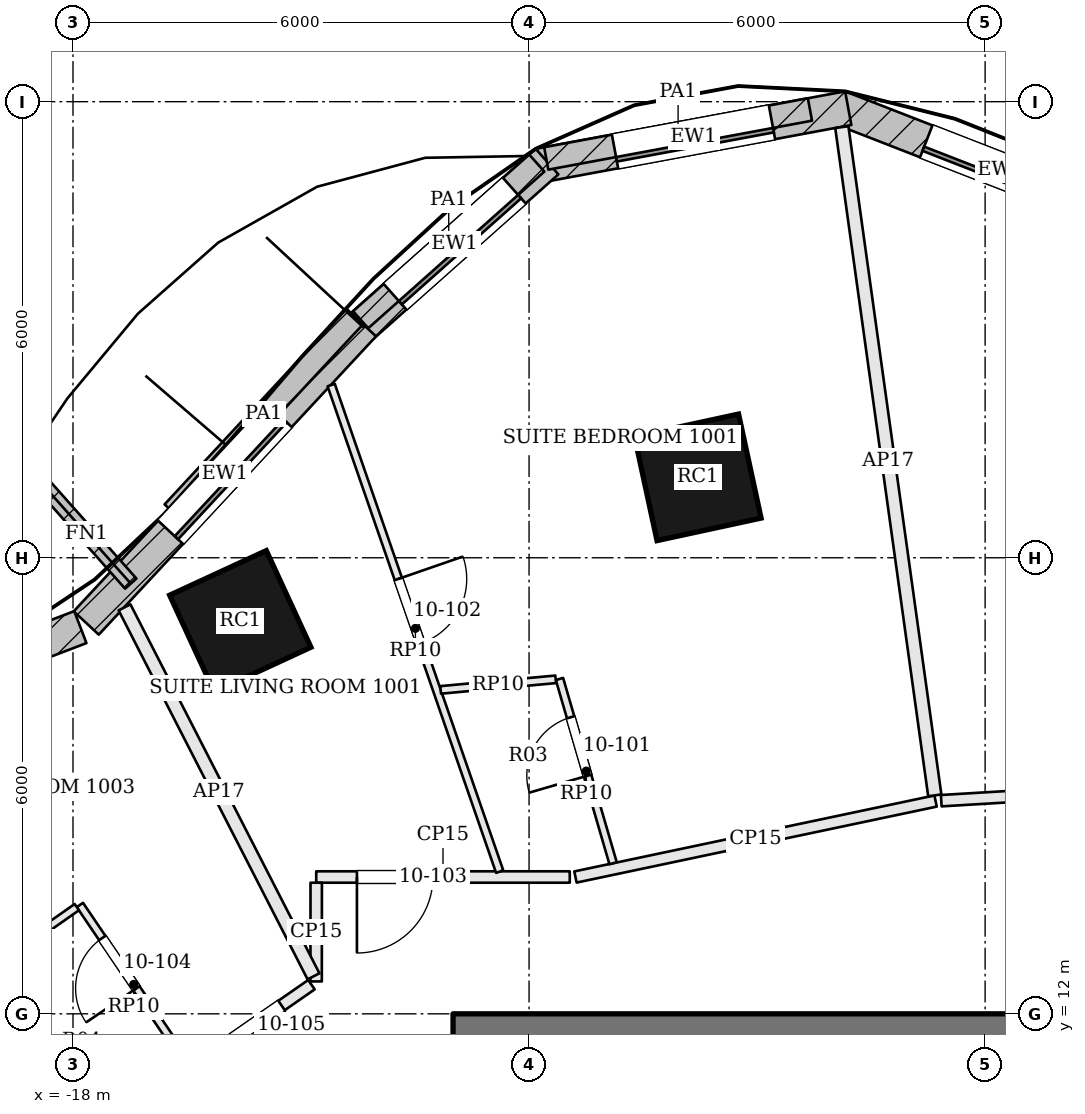
"""IFC4 building model, lengths in metres.
Left out: names, types, materials, properties, quantities, classifications, styles, units other than length and angle.
Written with IfcOpenShell. Run it as: python <this file> out.ifc"""

import sys

from ifc_helpers import new_model, si_unit, direction, frame, frame_2d, origin, origin_2d, place, context, subcontext, project, spatial, rectangle, extrude, element, fill, save


model = new_model("IFC4")
c1 = context("Model", 3, precision=1e-05, world=origin(), true_north=direction((0.0, 1.0)))
c2 = subcontext(c1, "Body", "Model", "MODEL_VIEW")
j1 = project(units=[si_unit("LENGTHUNIT", "METRE"), si_unit("PLANEANGLEUNIT", "RADIAN")], contexts=[c1])
p1 = place(None, origin())
s1 = spatial("IfcSite", under=j1, at=p1, CompositionType="ELEMENT")
p2 = place(p1, origin())
s2 = spatial("IfcBuilding", under=s1, at=p2, CompositionType="ELEMENT")
p3 = place(p2, frame((0.0, 0.0, 51.9)))
s3 = spatial("IfcBuildingStorey", under=s2, at=p3, CompositionType="ELEMENT", Elevation=51.9)
p4 = place(p3, frame((-13.0, 11.3, 0.0), z_axis=(0.0, 0.0, 1.0), x_axis=(1.0, 0.0, 0.0)))
e1 = element("IfcWall", 1, at=p4, inside=s3, PredefinedType="SHEAR", context=c2, shape_type="SweptSolid", body=[
    extrude(rectangle(XDim=26.0, YDim=1.4, at=frame_2d((13.0, 0.0))), origin(), (0.0, 0.0, 1.0), 3.6),
])
p5 = place(p4, frame((8.575, 0.0, 0.0)))
e2 = element("IfcOpeningElement", 2, at=p5, cuts=e1, PredefinedType="OPENING", context=c2, shape_type="SweptSolid", body=[
    extrude(rectangle(XDim=0.7, YDim=2.1, at=frame_2d((0.35, 1.05))), frame((0.0, 0.71, 0.0), z_axis=(0.0, -1.0, 0.0), x_axis=(1.0, 0.0, 0.0)), (0.0, 0.0, 1.0), 1.42),
])
p6 = place(p4, frame((10.875, 0.0, 0.0)))
e3 = element("IfcOpeningElement", 3, at=p6, cuts=e1, PredefinedType="OPENING", context=c2, shape_type="SweptSolid", body=[
    extrude(rectangle(XDim=1.0, YDim=2.1, at=frame_2d((0.5, 1.05))), frame((0.0, 0.71, 0.0), z_axis=(0.0, -1.0, 0.0), x_axis=(1.0, 0.0, 0.0)), (0.0, 0.0, 1.0), 1.42),
])
p7 = place(p4, frame((13.725, 0.0, 0.0)))
e4 = element("IfcOpeningElement", 4, at=p7, cuts=e1, PredefinedType="OPENING", context=c2, shape_type="SweptSolid", body=[
    extrude(rectangle(XDim=1.0, YDim=2.1, at=frame_2d((0.5, 1.05))), frame((0.0, 0.71, 0.0), z_axis=(0.0, -1.0, 0.0), x_axis=(1.0, 0.0, 0.0)), (0.0, 0.0, 1.0), 1.42),
])
p8 = place(p4, frame((16.175, 0.0, 0.0)))
e5 = element("IfcOpeningElement", 5, at=p8, cuts=e1, PredefinedType="OPENING", context=c2, shape_type="SweptSolid", body=[
    extrude(rectangle(XDim=1.0, YDim=2.1, at=frame_2d((0.5, 1.05))), frame((0.0, 0.71, 0.0), z_axis=(0.0, -1.0, 0.0), x_axis=(1.0, 0.0, 0.0)), (0.0, 0.0, 1.0), 1.42),
])
for number, where, z_axis, x_axis in (
    (6, (-9.78, 19.058, 0.0), (0.0, 0.0, 1.0), (-0.977, -0.211, 0.0)),
    (7, (-15.799, 17.165, 0.0), (0.0, 0.0, 1.0), (-0.908, -0.419, 0.0)),
):
    element("IfcColumn", number, at=place(p3, frame(where, z_axis=z_axis, x_axis=x_axis)), inside=s3, PredefinedType="COLUMN", context=c2, shape_type="SweptSolid", body=[
        extrude(rectangle(XDim=1.4, YDim=1.4, at=origin_2d()), origin(), (0.0, 0.0, 1.0), 3.6),
    ])
p9 = place(p3, frame((-3.672, 22.27, 0.0), z_axis=(0.0, 0.0, 1.0), x_axis=(-0.931791503167, 0.36299393194, 0.0)))
e8 = element("IfcWall", 8, at=p9, inside=s3, PredefinedType="SOLIDWALL", context=c2, shape_type="SweptSolid", body=[
    extrude(rectangle(XDim=4.56, YDim=0.45, at=frame_2d((2.28, 0.0))), origin(), (0.0, 0.0, 1.0), 3.4),
])
p10 = place(p9, frame((1.23, 0.0, 0.9)))
e9 = element("IfcOpeningElement", 9, at=p10, cuts=e8, PredefinedType="OPENING", context=c2, shape_type="SweptSolid", body=[
    extrude(rectangle(XDim=2.1, YDim=2.0, at=frame_2d((1.05, 1.0))), frame((0.0, 0.235, 0.0), z_axis=(0.0, -1.0, 0.0), x_axis=(1.0, 0.0, 0.0)), (0.0, 0.0, 1.0), 0.47),
])
p11 = place(p3, frame((-7.801, 23.915, 0.0), z_axis=(0.0, 0.0, 1.0), x_axis=(-0.983186467795, -0.182604407242, 0.0)))
e10 = element("IfcWall", 10, at=p11, inside=s3, PredefinedType="SOLIDWALL", context=c2, shape_type="SweptSolid", body=[
    extrude(rectangle(XDim=4.141, YDim=0.45, at=frame_2d((2.07, 0.0))), origin(), (0.0, 0.0, 1.0), 3.4),
])
p12 = place(p11, frame((1.02, 0.0, 0.9)))
e11 = element("IfcOpeningElement", 11, at=p12, cuts=e10, PredefinedType="OPENING", context=c2, shape_type="SweptSolid", body=[
    extrude(rectangle(XDim=2.1, YDim=2.0, at=frame_2d((1.05, 1.0))), frame((0.0, 0.235, 0.0), z_axis=(0.0, -1.0, 0.0), x_axis=(1.0, 0.0, 0.0)), (0.0, 0.0, 1.0), 0.47),
])
p13 = place(p3, frame((-11.763, 23.212, 0.0), z_axis=(0.0, 0.0, 1.0), x_axis=(-0.74723528797, -0.664559571755, 0.0)))
e12 = element("IfcWall", 12, at=p13, inside=s3, PredefinedType="SOLIDWALL", context=c2, shape_type="SweptSolid", body=[
    extrude(rectangle(XDim=3.251, YDim=0.45, at=frame_2d((1.625, 0.0))), origin(), (0.0, 0.0, 1.0), 3.4),
])
p14 = place(p13, frame((0.576, 0.0, 0.9)))
e13 = element("IfcOpeningElement", 13, at=p14, cuts=e12, PredefinedType="OPENING", context=c2, shape_type="SweptSolid", body=[
    extrude(rectangle(XDim=2.1, YDim=2.0, at=frame_2d((1.05, 1.0))), frame((0.0, 0.235, 0.0), z_axis=(0.0, -1.0, 0.0), x_axis=(1.0, 0.0, 0.0)), (0.0, 0.0, 1.0), 0.47),
])
p15 = place(p3, frame((-14.177, 21.066, 0.0), z_axis=(0.0, 0.0, 1.0), x_axis=(-0.680847709714, -0.732425010617, 0.0)))
e14 = element("IfcWall", 14, at=p15, inside=s3, PredefinedType="SOLIDWALL", context=c2, shape_type="SweptSolid", body=[
    extrude(rectangle(XDim=5.358, YDim=0.45, at=frame_2d((2.679, 0.0))), origin(), (0.0, 0.0, 1.0), 3.4),
])
p16 = place(p15, frame((1.629, 0.0, 0.9)))
e15 = element("IfcOpeningElement", 15, at=p16, cuts=e14, PredefinedType="OPENING", context=c2, shape_type="SweptSolid", body=[
    extrude(rectangle(XDim=2.1, YDim=2.0, at=frame_2d((1.05, 1.0))), frame((0.0, 0.235, 0.0), z_axis=(0.0, -1.0, 0.0), x_axis=(1.0, 0.0, 0.0)), (0.0, 0.0, 1.0), 0.47),
])
p17 = place(p3, frame((-17.903, 17.087, 0.0), z_axis=(0.0, 0.0, 1.0), x_axis=(-0.934145554025, -0.356892258105, 0.0)))
e16 = element("IfcWall", 16, at=p17, inside=s3, PredefinedType="SOLIDWALL", context=c2, shape_type="SweptSolid", body=[
    extrude(rectangle(XDim=4.165, YDim=0.45, at=frame_2d((2.082, 0.0))), origin(), (0.0, 0.0, 1.0), 3.4),
])
p18 = place(p17, frame((1.182, 0.0, 0.9)))
e17 = element("IfcOpeningElement", 17, at=p18, cuts=e16, PredefinedType="OPENING", context=c2, shape_type="SweptSolid", body=[
    extrude(rectangle(XDim=1.8, YDim=2.0, at=frame_2d((0.9, 1.0))), frame((0.0, 0.235, 0.0), z_axis=(0.0, -1.0, 0.0), x_axis=(1.0, 0.0, 0.0)), (0.0, 0.0, 1.0), 0.47),
])
p19 = place(p3, frame((-17.24, 17.66, 0.0), z_axis=(0.0, 0.0, 1.0), x_axis=(-0.664017424016, 0.747717099312, 0.0)))
e18 = element("IfcWall", 18, at=p19, inside=s3, PredefinedType="SOLIDWALL", context=c2, shape_type="SweptSolid", body=[
    extrude(rectangle(XDim=1.75, YDim=0.2, at=frame_2d((0.875, 0.0))), origin(), (0.0, 0.0, 1.0), 3.4),
])
p20 = place(p3, frame((-8.304, 23.897, 3.6), z_axis=(0.0, 0.0, 1.0), x_axis=(-0.983203460001, -0.182512893356, 0.0)))
e19 = element("IfcWall", 19, at=p20, inside=s3, PredefinedType="PARAPET", context=c2, shape_type="SweptSolid", body=[
    extrude(rectangle(XDim=3.529, YDim=0.3, at=frame_2d((1.764, 0.0))), origin(), (0.0, 0.0, 1.0), 1.1),
])
p21 = place(p3, frame((-11.898, 23.192, 3.6), z_axis=(0.0, 0.0, 1.0), x_axis=(-0.74726596591, -0.664525075669, 0.0)))
e20 = element("IfcWall", 20, at=p21, inside=s3, PredefinedType="PARAPET", context=c2, shape_type="SweptSolid", body=[
    extrude(rectangle(XDim=3.101, YDim=0.3, at=frame_2d((1.551, 0.0))), origin(), (0.0, 0.0, 1.0), 1.1),
])
p22 = place(p3, frame((-14.293, 21.174, 3.6), z_axis=(0.0, 0.0, 1.0), x_axis=(-0.680821476217, -0.732449395877, 0.0)))
e21 = element("IfcWall", 21, at=p22, inside=s3, PredefinedType="PARAPET", context=c2, shape_type="SweptSolid", body=[
    extrude(rectangle(XDim=3.513, YDim=0.3, at=frame_2d((1.757, 0.0))), origin(), (0.0, 0.0, 1.0), 1.1),
])
p23 = place(p3, frame((-6.652, 14.8, 0.0), z_axis=(0.0, 0.0, 1.0), x_axis=(-0.978460885149, -0.206432304241, 0.0)))
e22 = element("IfcWall", 22, at=p23, inside=s3, PredefinedType="PARTITIONING", context=c2, shape_type="SweptSolid", body=[
    extrude(rectangle(XDim=4.842, YDim=0.15, at=frame_2d((2.421, 0.0))), origin(), (0.0, 0.0, 1.0), 2.68),
])
p24 = place(p3, frame((-11.464, 13.8, 0.0), z_axis=(0.0, 0.0, 1.0), x_axis=(-1.0, 0.0, 0.0)))
e23 = element("IfcWall", 23, at=p24, inside=s3, PredefinedType="PARTITIONING", context=c2, shape_type="SweptSolid", body=[
    extrude(rectangle(XDim=3.336, YDim=0.15, at=frame_2d((1.668, 0.0))), origin(), (0.0, 0.0, 1.0), 2.68),
])
p25 = place(p24, frame((1.8, 0.0, 0.0)))
e24 = element("IfcOpeningElement", 24, at=p25, cuts=e23, PredefinedType="OPENING", context=c2, shape_type="SweptSolid", body=[
    extrude(rectangle(XDim=1.0, YDim=2.1, at=frame_2d((0.5, 1.05))), frame((0.0, 0.085, 0.0), z_axis=(0.0, -1.0, 0.0), x_axis=(1.0, 0.0, 0.0)), (0.0, 0.0, 1.0), 0.17),
])
p26 = place(p3, frame((-14.8, 13.725, 0.0), z_axis=(0.0, 0.0, 1.0), x_axis=(-0.001127606876, -0.999999364251, 0.0)))
e25 = element("IfcWall", 25, at=p26, inside=s3, PredefinedType="PARTITIONING", context=c2, shape_type="SweptSolid", body=[
    extrude(rectangle(XDim=1.299, YDim=0.15, at=frame_2d((0.649, 0.0))), origin(), (0.0, 0.0, 1.0), 2.68),
])
p27 = place(p3, frame((-7.885, 23.666, 0.0), z_axis=(0.0, 0.0, 1.0), x_axis=(0.137796980914, -0.990460494947, 0.0)))
e26 = element("IfcWall", 26, at=p27, inside=s3, PredefinedType="PARTITIONING", context=c2, shape_type="SweptSolid", body=[
    extrude(rectangle(XDim=8.876, YDim=0.175, at=frame_2d((4.438, 0.0))), origin(), (0.0, 0.0, 1.0), 2.68),
])
p28 = place(p3, frame((-17.322, 17.347, 0.0), z_axis=(0.0, 0.0, 1.0), x_axis=(0.455858572344, -0.890052224322, 0.0)))
e27 = element("IfcWall", 27, at=p28, inside=s3, PredefinedType="PARTITIONING", context=c2, shape_type="SweptSolid", body=[
    extrude(rectangle(XDim=5.454, YDim=0.175, at=frame_2d((2.727, 0.0))), origin(), (0.0, 0.0, 1.0), 2.68),
])
p29 = place(p3, frame((-14.863, 12.383, 0.0), z_axis=(0.0, 0.0, 1.0), x_axis=(-0.821141348731, -0.570724877155, 0.0)))
e28 = element("IfcWall", 28, at=p29, inside=s3, PredefinedType="PARTITIONING", context=c2, shape_type="SweptSolid", body=[
    extrude(rectangle(XDim=3.434, YDim=0.15, at=frame_2d((1.717, 0.0))), origin(), (0.0, 0.0, 1.0), 2.68),
])
p30 = place(p29, frame((0.479, 0.0, 0.0)))
e29 = element("IfcOpeningElement", 29, at=p30, cuts=e28, PredefinedType="OPENING", context=c2, shape_type="SweptSolid", body=[
    extrude(rectangle(XDim=0.9, YDim=2.4, at=frame_2d((0.45, 1.2))), frame((0.0, 0.085, 0.0), z_axis=(0.0, -1.0, 0.0), x_axis=(1.0, 0.0, 0.0)), (0.0, 0.0, 1.0), 0.17),
])
p31 = place(p3, frame((-20.292, 13.608, 0.0), z_axis=(0.0, 0.0, 1.0), x_axis=(0.633888862279, -0.773424146428, 0.0)))
e30 = element("IfcWall", 30, at=p31, inside=s3, PredefinedType="PARTITIONING", context=c2, shape_type="SweptSolid", body=[
    extrude(rectangle(XDim=4.042, YDim=0.175, at=frame_2d((2.021, 0.0))), origin(), (0.0, 0.0, 1.0), 2.68),
])
p32 = place(p3, frame((-0.075, 15.195, 0.0), z_axis=(0.0, 0.0, 1.0), x_axis=(-0.998193444214, -0.060082010028, 0.0)))
e31 = element("IfcWall", 31, at=p32, inside=s3, PredefinedType="PARTITIONING", context=c2, shape_type="SweptSolid", body=[
    extrude(rectangle(XDim=6.514, YDim=0.15, at=frame_2d((3.257, 0.0))), origin(), (0.0, 0.0, 1.0), 2.68),
])
p33 = place(p32, frame((2.859, 0.0, 0.0)))
e32 = element("IfcOpeningElement", 32, at=p33, cuts=e31, PredefinedType="OPENING", context=c2, shape_type="SweptSolid", body=[
    extrude(rectangle(XDim=1.0, YDim=2.1, at=frame_2d((0.5, 1.05))), frame((0.0, 0.085, 0.0), z_axis=(0.0, -1.0, 0.0), x_axis=(1.0, 0.0, 0.0)), (0.0, 0.0, 1.0), 0.17),
])
p34 = place(p3, frame((-14.603, 20.272, 0.0), z_axis=(0.0, 0.0, 1.0), x_axis=(0.327245485349, -0.94493935907, 0.0)))
e33 = element("IfcWall", 33, at=p34, inside=s3, PredefinedType="PARTITIONING", context=c2, shape_type="SweptSolid", body=[
    extrude(rectangle(XDim=6.774, YDim=0.1, at=frame_2d((3.387, 0.0))), origin(), (0.0, 0.0, 1.0), 2.898),
])
p35 = place(p34, frame((2.699, 0.0, 0.0)))
e34 = element("IfcOpeningElement", 34, at=p35, cuts=e33, PredefinedType="OPENING", context=c2, shape_type="SweptSolid", body=[
    extrude(rectangle(XDim=0.9, YDim=2.4, at=frame_2d((0.45, 1.2))), frame((0.0, 0.06, 0.0), z_axis=(0.0, -1.0, 0.0), x_axis=(1.0, 0.0, 0.0)), (0.0, 0.0, 1.0), 0.12),
])
p36 = place(p3, frame((-10.894, 13.981, 0.0), z_axis=(0.0, 0.0, 1.0), x_axis=(-0.279443000738, 0.960162282814, 0.0)))
e35 = element("IfcWall", 35, at=p36, inside=s3, PredefinedType="PARTITIONING", context=c2, shape_type="SweptSolid", body=[
    extrude(rectangle(XDim=2.525, YDim=0.1, at=frame_2d((1.262, 0.0))), origin(), (0.0, 0.0, 1.0), 2.898),
])
p37 = place(p36, frame((1.2, 0.0, 0.0)))
e36 = element("IfcOpeningElement", 36, at=p37, cuts=e35, PredefinedType="OPENING", context=c2, shape_type="SweptSolid", body=[
    extrude(rectangle(XDim=0.8, YDim=2.1, at=frame_2d((0.4, 1.05))), frame((0.0, 0.06, 0.0), z_axis=(0.0, -1.0, 0.0), x_axis=(1.0, 0.0, 0.0)), (0.0, 0.0, 1.0), 0.12),
])
p38 = place(p3, frame((-11.65, 16.401, 0.0), z_axis=(0.0, 0.0, 1.0), x_axis=(-0.995799189088, -0.091564048682, 0.0)))
e37 = element("IfcWall", 37, at=p38, inside=s3, PredefinedType="PARTITIONING", context=c2, shape_type="SweptSolid", body=[
    extrude(rectangle(XDim=1.52, YDim=0.1, at=frame_2d((0.76, 0.0))), origin(), (0.0, 0.0, 1.0), 2.898),
])
p39 = place(p3, frame((-16.493, 11.342, 0.0), z_axis=(0.0, 0.0, 1.0), x_axis=(-0.560910145084, 0.827876687159, 0.0)))
e38 = element("IfcWall", 38, at=p39, inside=s3, PredefinedType="PARTITIONING", context=c2, shape_type="SweptSolid", body=[
    extrude(rectangle(XDim=2.525, YDim=0.1, at=frame_2d((1.262, 0.0))), origin(), (0.0, 0.0, 1.0), 2.898),
])
p40 = place(p39, frame((1.2, 0.0, 0.0)))
e39 = element("IfcOpeningElement", 39, at=p40, cuts=e38, PredefinedType="OPENING", context=c2, shape_type="SweptSolid", body=[
    extrude(rectangle(XDim=0.8, YDim=2.1, at=frame_2d((0.4, 1.05))), frame((0.0, 0.06, 0.0), z_axis=(0.0, -1.0, 0.0), x_axis=(1.0, 0.0, 0.0)), (0.0, 0.0, 1.0), 0.12),
])
p41 = place(p3, frame((-17.95, 13.404, 0.0), z_axis=(0.0, 0.0, 1.0), x_axis=(-0.818576684684, -0.574397259127, 0.0)))
e40 = element("IfcWall", 40, at=p41, inside=s3, PredefinedType="PARTITIONING", context=c2, shape_type="SweptSolid", body=[
    extrude(rectangle(XDim=1.612, YDim=0.1, at=frame_2d((0.806, 0.0))), origin(), (0.0, 0.0, 1.0), 2.898),
])
p42 = place(p10, origin())
e41 = element("IfcWindow", 41, at=p42, inside=s3, PartitioningType="SINGLE_PANEL", PredefinedType="WINDOW", context=c2, shape_type="SweptSolid", body=[
    extrude(rectangle(XDim=2.1, YDim=2.0, at=frame_2d((1.05, 1.0))), frame((0.0, 0.135, 0.0), z_axis=(0.0, -1.0, 0.0), x_axis=(1.0, 0.0, 0.0)), (0.0, 0.0, 1.0), 0.06),
])
fill(e9, e41)
p43 = place(p12, origin())
e42 = element("IfcWindow", 42, at=p43, inside=s3, PartitioningType="SINGLE_PANEL", PredefinedType="WINDOW", context=c2, shape_type="SweptSolid", body=[
    extrude(rectangle(XDim=2.1, YDim=2.0, at=frame_2d((1.05, 1.0))), frame((0.0, 0.135, 0.0), z_axis=(0.0, -1.0, 0.0), x_axis=(1.0, 0.0, 0.0)), (0.0, 0.0, 1.0), 0.06),
])
fill(e11, e42)
p44 = place(p14, origin())
e43 = element("IfcWindow", 43, at=p44, inside=s3, PartitioningType="SINGLE_PANEL", PredefinedType="WINDOW", context=c2, shape_type="SweptSolid", body=[
    extrude(rectangle(XDim=2.1, YDim=2.0, at=frame_2d((1.05, 1.0))), frame((0.0, 0.135, 0.0), z_axis=(0.0, -1.0, 0.0), x_axis=(1.0, 0.0, 0.0)), (0.0, 0.0, 1.0), 0.06),
])
fill(e13, e43)
p45 = place(p16, origin())
e44 = element("IfcWindow", 44, at=p45, inside=s3, PartitioningType="SINGLE_PANEL", PredefinedType="WINDOW", context=c2, shape_type="SweptSolid", body=[
    extrude(rectangle(XDim=2.1, YDim=2.0, at=frame_2d((1.05, 1.0))), frame((0.0, 0.135, 0.0), z_axis=(0.0, -1.0, 0.0), x_axis=(1.0, 0.0, 0.0)), (0.0, 0.0, 1.0), 0.06),
])
fill(e15, e44)
p46 = place(p37, origin())
e45 = element("IfcDoor", 45, at=p46, inside=s3, OperationType="SINGLE_SWING_LEFT", PredefinedType="DOOR", context=c2, shape_type="SweptSolid", body=[
    extrude(rectangle(XDim=0.8, YDim=2.1, at=frame_2d((0.4, 1.05))), frame((0.0, 0.025, 0.0), z_axis=(0.0, -1.0, 0.0), x_axis=(1.0, 0.0, 0.0)), (0.0, 0.0, 1.0), 0.05),
])
fill(e36, e45)
p47 = place(p35, origin())
e46 = element("IfcDoor", 46, at=p47, inside=s3, OperationType="SINGLE_SWING_LEFT", PredefinedType="DOOR", context=c2, shape_type="SweptSolid", body=[
    extrude(rectangle(XDim=0.9, YDim=2.4, at=frame_2d((0.45, 1.2))), frame((0.0, 0.025, 0.0), z_axis=(0.0, -1.0, 0.0), x_axis=(1.0, 0.0, 0.0)), (0.0, 0.0, 1.0), 0.05),
])
fill(e34, e46)
p48 = place(p25, origin())
e47 = element("IfcDoor", 47, at=p48, inside=s3, OperationType="SINGLE_SWING_RIGHT", PredefinedType="DOOR", context=c2, shape_type="SweptSolid", body=[
    extrude(rectangle(XDim=1.0, YDim=2.1, at=frame_2d((0.5, 1.05))), frame((0.0, 0.025, 0.0), z_axis=(0.0, -1.0, 0.0), x_axis=(1.0, 0.0, 0.0)), (0.0, 0.0, 1.0), 0.05),
])
fill(e24, e47)
p49 = place(p40, origin())
e48 = element("IfcDoor", 48, at=p49, inside=s3, OperationType="SINGLE_SWING_LEFT", PredefinedType="DOOR", context=c2, shape_type="SweptSolid", body=[
    extrude(rectangle(XDim=0.8, YDim=2.1, at=frame_2d((0.4, 1.05))), frame((0.0, 0.025, 0.0), z_axis=(0.0, -1.0, 0.0), x_axis=(1.0, 0.0, 0.0)), (0.0, 0.0, 1.0), 0.05),
])
fill(e39, e48)
p50 = place(p30, origin())
e49 = element("IfcDoor", 49, at=p50, inside=s3, OperationType="SINGLE_SWING_RIGHT", PredefinedType="DOOR", context=c2, shape_type="SweptSolid", body=[
    extrude(rectangle(XDim=0.9, YDim=2.4, at=frame_2d((0.45, 1.2))), frame((0.0, 0.025, 0.0), z_axis=(0.0, -1.0, 0.0), x_axis=(1.0, 0.0, 0.0)), (0.0, 0.0, 1.0), 0.05),
])
fill(e29, e49)
save(model, sys.argv[1])
